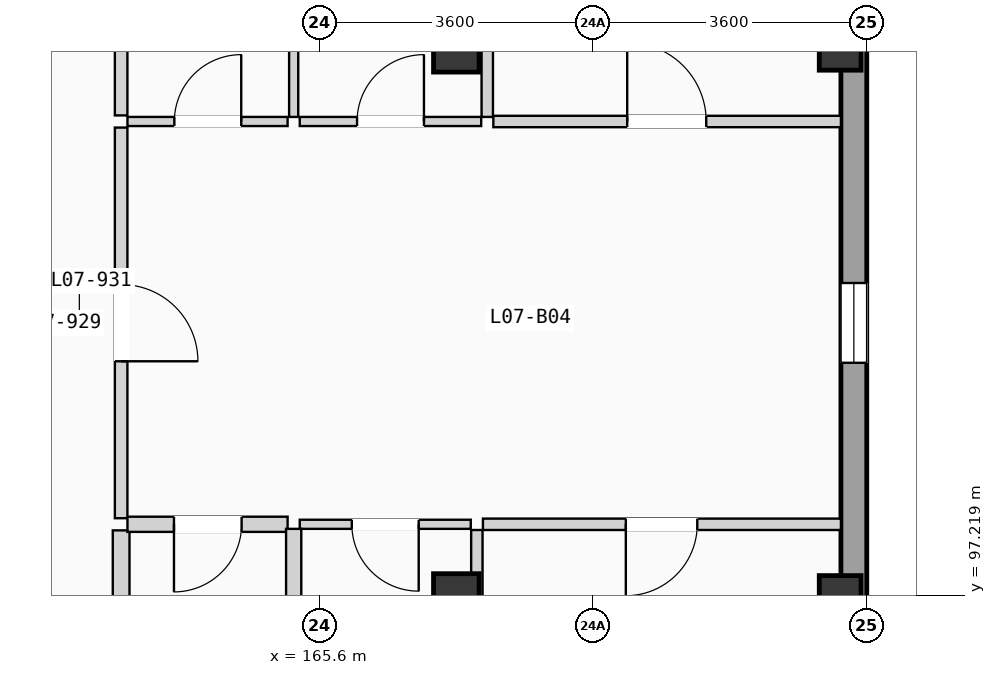
"""IFC4 building model, lengths in metres.
Left out: names, types, materials, properties, quantities, classifications, styles, units other than length and angle.
Written with IfcOpenShell. Run it as: python <this file> out.ifc"""

import sys

from ifc_helpers import new_model, si_unit, direction, frame, frame_2d, origin, origin_2d, place, context, subcontext, project, spatial, rectangle, extrude, element, fill, save


model = new_model("IFC4")
c1 = context("Model", 3, precision=1e-05, world=origin(), true_north=direction((0.0, 1.0)))
c2 = subcontext(c1, "Body", "Model", "MODEL_VIEW")
j1 = project(units=[si_unit("LENGTHUNIT", "METRE"), si_unit("PLANEANGLEUNIT", "RADIAN")], contexts=[c1])
p1 = place(None, origin())
s1 = spatial("IfcSite", under=j1, at=p1, CompositionType="ELEMENT")
p2 = place(p1, origin())
s2 = spatial("IfcBuilding", under=s1, at=p2, CompositionType="ELEMENT")
p3 = place(p2, frame((0.0, 0.0, 24.675)))
s3 = spatial("IfcBuildingStorey", under=s2, at=p3, CompositionType="ELEMENT", Elevation=24.675)
for number, where, z_axis, x_axis in (
    (1, (167.4, 97.2, 0.0), (0.0, 0.0, 1.0), (1.0, 0.0, 0.0)),
    (2, (167.4, 104.4, 0.0), (0.0, 0.0, 1.0), (1.0, 0.0, 0.0)),
):
    element("IfcColumn", number, at=place(p3, frame(where, z_axis=z_axis, x_axis=x_axis)), inside=s3, PredefinedType="COLUMN", context=c2, shape_type="SweptSolid", body=[
        extrude(rectangle(XDim=0.6, YDim=0.6, at=origin_2d()), origin(), (0.0, 0.0, 1.0), 3.15),
    ])
for number, where, z_axis, x_axis in (
    (3, (172.45, 97.2, 0.0), (0.0, 0.0, 1.0), (1.0, 0.0, 0.0)),
    (4, (172.45, 104.4, 0.0), (0.0, 0.0, 1.0), (1.0, 0.0, 0.0)),
):
    element("IfcColumn", number, at=place(p3, frame(where, z_axis=z_axis, x_axis=x_axis)), inside=s3, PredefinedType="COLUMN", context=c2, shape_type="SweptSolid", body=[
        extrude(rectangle(XDim=0.55, YDim=0.55, at=origin_2d()), origin(), (0.0, 0.0, 1.0), 3.15),
    ])
p4 = place(p3, frame((172.63, 68.74, 0.0), z_axis=(0.0, 0.0, 1.0), x_axis=(0.0, 1.0, 0.0)))
e5 = element("IfcWall", 5, at=p4, inside=s3, PredefinedType="SOLIDWALL", context=c2, shape_type="SweptSolid", body=[
    extrude(rectangle(XDim=49.72, YDim=0.34, at=frame_2d((24.86, 0.0))), origin(), (0.0, 0.0, 1.0), 2.9),
])
p5 = place(p4, frame((15.299, 0.0, 0.9)))
e6 = element("IfcOpeningElement", 6, at=p5, cuts=e5, PredefinedType="OPENING", context=c2, shape_type="SweptSolid", body=[
    extrude(rectangle(XDim=1.05, YDim=1.2, at=frame_2d((0.525, 0.6))), frame((0.0, 0.18, 0.0), z_axis=(0.0, -1.0, 0.0), x_axis=(1.0, 0.0, 0.0)), (0.0, 0.0, 1.0), 0.36),
])
p6 = place(p4, frame((8.972, 0.0, 0.865)))
e7 = element("IfcOpeningElement", 7, at=p6, cuts=e5, PredefinedType="OPENING", context=c2, shape_type="SweptSolid", body=[
    extrude(rectangle(XDim=1.05, YDim=1.35, at=frame_2d((0.525, 0.675))), frame((0.0, 0.18, 0.0), z_axis=(0.0, -1.0, 0.0), x_axis=(1.0, 0.0, 0.0)), (0.0, 0.0, 1.0), 0.36),
])
p7 = place(p4, frame((18.71, 0.0, 0.715)))
e8 = element("IfcOpeningElement", 8, at=p7, cuts=e5, PredefinedType="OPENING", context=c2, shape_type="SweptSolid", body=[
    extrude(rectangle(XDim=1.05, YDim=1.5, at=frame_2d((0.525, 0.75))), frame((0.0, 0.18, 0.0), z_axis=(0.0, -1.0, 0.0), x_axis=(1.0, 0.0, 0.0)), (0.0, 0.0, 1.0), 0.36),
])
p8 = place(p4, frame((31.535, 0.0, 0.565)))
e9 = element("IfcOpeningElement", 9, at=p8, cuts=e5, PredefinedType="OPENING", context=c2, shape_type="SweptSolid", body=[
    extrude(rectangle(XDim=1.05, YDim=1.65, at=frame_2d((0.525, 0.825))), frame((0.0, 0.18, 0.0), z_axis=(0.0, -1.0, 0.0), x_axis=(1.0, 0.0, 0.0)), (0.0, 0.0, 1.0), 0.36),
])
p9 = place(p4, frame((24.687, 0.0, 0.85)))
e10 = element("IfcOpeningElement", 10, at=p9, cuts=e5, PredefinedType="OPENING", context=c2, shape_type="SweptSolid", body=[
    extrude(rectangle(XDim=0.95, YDim=1.2, at=frame_2d((0.475, 0.6))), frame((0.0, 0.18, 0.0), z_axis=(0.0, -1.0, 0.0), x_axis=(1.0, 0.0, 0.0)), (0.0, 0.0, 1.0), 0.36),
])
p10 = place(p4, frame((38.62, 0.0, 0.9)))
e11 = element("IfcOpeningElement", 11, at=p10, cuts=e5, PredefinedType="OPENING", context=c2, shape_type="SweptSolid", body=[
    extrude(rectangle(XDim=1.15, YDim=1.2, at=frame_2d((0.575, 0.6))), frame((0.0, 0.18, 0.0), z_axis=(0.0, -1.0, 0.0), x_axis=(1.0, 0.0, 0.0)), (0.0, 0.0, 1.0), 0.36),
])
p11 = place(p3, frame((162.99, 98.23, 0.0), z_axis=(0.0, 0.0, 1.0), x_axis=(0.0, 1.0, 0.0)))
e12 = element("IfcWall", 12, at=p11, inside=s3, PredefinedType="PARTITIONING", context=c2, shape_type="SweptSolid", body=[
    extrude(rectangle(XDim=5.14, YDim=0.165, at=frame_2d((2.57, 0.0))), origin(), (0.0, 0.0, 1.0), 2.87),
])
p12 = place(p11, frame((2.065, 0.0, 0.0)))
e13 = element("IfcOpeningElement", 13, at=p12, cuts=e12, PredefinedType="OPENING", context=c2, shape_type="SweptSolid", body=[
    extrude(rectangle(XDim=1.01, YDim=2.11, at=frame_2d((0.505, 1.055))), frame((0.0, 0.093, 0.0), z_axis=(0.0, -1.0, 0.0), x_axis=(1.0, 0.0, 0.0)), (0.0, 0.0, 1.0), 0.185),
])
p13 = place(p3, frame((162.99, 90.874, 0.0), z_axis=(0.0, 0.0, 1.0), x_axis=(0.0, 1.0, 0.0)))
e14 = element("IfcWall", 14, at=p13, inside=s3, PredefinedType="PLUMBINGWALL", context=c2, shape_type="SweptSolid", body=[
    extrude(rectangle(XDim=7.196, YDim=0.22, at=frame_2d((3.598, 0.0))), origin(), (0.0, 0.0, 1.0), 2.87),
])
p14 = place(p3, frame((162.99, 103.53, 0.0), z_axis=(0.0, 0.0, 1.0), x_axis=(0.0, 1.0, 0.0)))
e15 = element("IfcWall", 15, at=p14, inside=s3, PredefinedType="PARTITIONING", context=c2, shape_type="SweptSolid", body=[
    extrude(rectangle(XDim=7.67, YDim=0.165, at=frame_2d((3.835, 0.0))), origin(), (0.0, 0.0, 1.0), 2.87),
])
p15 = place(p3, frame((163.073, 98.15, 0.0), z_axis=(0.0, 0.0, 1.0), x_axis=(1.0, 0.0, 0.0)))
e16 = element("IfcWall", 16, at=p15, inside=s3, PredefinedType="PLUMBINGWALL", context=c2, shape_type="SweptSolid", body=[
    extrude(rectangle(XDim=2.107, YDim=0.2, at=frame_2d((1.053, 0.0))), origin(), (0.0, 0.0, 1.0), 2.87),
])
p16 = place(p15, frame((0.612, 0.0, 0.0)))
e17 = element("IfcOpeningElement", 17, at=p16, cuts=e16, PredefinedType="OPENING", context=c2, shape_type="SweptSolid", body=[
    extrude(rectangle(XDim=0.89, YDim=2.03, at=frame_2d((0.445, 1.015))), frame((0.0, 0.11, 0.0), z_axis=(0.0, -1.0, 0.0), x_axis=(1.0, 0.0, 0.0)), (0.0, 0.0, 1.0), 0.22),
])
p17 = place(p3, frame((163.073, 103.45, 0.0), z_axis=(0.0, 0.0, 1.0), x_axis=(1.0, 0.0, 0.0)))
e18 = element("IfcWall", 18, at=p17, inside=s3, PredefinedType="PARTITIONING", context=c2, shape_type="SweptSolid", body=[
    extrude(rectangle(XDim=2.107, YDim=0.12, at=frame_2d((1.053, 0.0))), origin(), (0.0, 0.0, 1.0), 2.87),
])
p18 = place(p17, frame((0.617, 0.0, 0.0)))
e19 = element("IfcOpeningElement", 19, at=p18, cuts=e18, PredefinedType="OPENING", context=c2, shape_type="SweptSolid", body=[
    extrude(rectangle(XDim=0.88, YDim=2.02, at=frame_2d((0.44, 1.01))), frame((0.0, 0.07, 0.0), z_axis=(0.0, -1.0, 0.0), x_axis=(1.0, 0.0, 0.0)), (0.0, 0.0, 1.0), 0.14),
])
p19 = place(p3, frame((167.75, 98.15, 0.0), z_axis=(0.0, 0.0, 1.0), x_axis=(1.0, 0.0, 0.0)))
e20 = element("IfcWall", 20, at=p19, inside=s3, PredefinedType="PARTITIONING", context=c2, shape_type="SweptSolid", body=[
    extrude(rectangle(XDim=4.71, YDim=0.15, at=frame_2d((2.355, 0.0))), origin(), (0.0, 0.0, 1.0), 2.87),
])
p20 = place(p19, frame((1.88, 0.0, 0.0)))
e21 = element("IfcOpeningElement", 21, at=p20, cuts=e20, PredefinedType="OPENING", context=c2, shape_type="SweptSolid", body=[
    extrude(rectangle(XDim=0.94, YDim=2.06, at=frame_2d((0.47, 1.03))), frame((0.0, 0.085, 0.0), z_axis=(0.0, -1.0, 0.0), x_axis=(1.0, 0.0, 0.0)), (0.0, 0.0, 1.0), 0.17),
])
p21 = place(p3, frame((165.34, 98.15, 0.0), z_axis=(0.0, 0.0, 1.0), x_axis=(1.0, 0.0, 0.0)))
e22 = element("IfcWall", 22, at=p21, inside=s3, PredefinedType="PARTITIONING", context=c2, shape_type="SweptSolid", body=[
    extrude(rectangle(XDim=2.25, YDim=0.12, at=frame_2d((1.125, 0.0))), origin(), (0.0, 0.0, 1.0), 2.87),
])
p22 = place(p21, frame((0.685, 0.0, 0.0)))
e23 = element("IfcOpeningElement", 23, at=p22, cuts=e22, PredefinedType="OPENING", context=c2, shape_type="SweptSolid", body=[
    extrude(rectangle(XDim=0.88, YDim=2.02, at=frame_2d((0.44, 1.01))), frame((0.0, 0.07, 0.0), z_axis=(0.0, -1.0, 0.0), x_axis=(1.0, 0.0, 0.0)), (0.0, 0.0, 1.0), 0.14),
])
p23 = place(p3, frame((167.887, 103.45, 0.0), z_axis=(0.0, 0.0, 1.0), x_axis=(1.0, 0.0, 0.0)))
e24 = element("IfcWall", 24, at=p23, inside=s3, PredefinedType="PARTITIONING", context=c2, shape_type="SweptSolid", body=[
    extrude(rectangle(XDim=4.573, YDim=0.15, at=frame_2d((2.287, 0.0))), origin(), (0.0, 0.0, 1.0), 2.87),
])
p24 = place(p23, frame((1.761, 0.0, 0.0)))
e25 = element("IfcOpeningElement", 25, at=p24, cuts=e24, PredefinedType="OPENING", context=c2, shape_type="SweptSolid", body=[
    extrude(rectangle(XDim=1.04, YDim=2.08, at=frame_2d((0.52, 1.04))), frame((0.0, 0.085, 0.0), z_axis=(0.0, -1.0, 0.0), x_axis=(1.0, 0.0, 0.0)), (0.0, 0.0, 1.0), 0.17),
])
p25 = place(p3, frame((165.34, 103.45, 0.0), z_axis=(0.0, 0.0, 1.0), x_axis=(1.0, 0.0, 0.0)))
e26 = element("IfcWall", 26, at=p25, inside=s3, PredefinedType="PARTITIONING", context=c2, shape_type="SweptSolid", body=[
    extrude(rectangle(XDim=2.387, YDim=0.12, at=frame_2d((1.193, 0.0))), origin(), (0.0, 0.0, 1.0), 2.87),
])
p26 = place(p25, frame((0.754, 0.0, 0.0)))
e27 = element("IfcOpeningElement", 27, at=p26, cuts=e26, PredefinedType="OPENING", context=c2, shape_type="SweptSolid", body=[
    extrude(rectangle(XDim=0.88, YDim=2.02, at=frame_2d((0.44, 1.01))), frame((0.0, 0.07, 0.0), z_axis=(0.0, -1.0, 0.0), x_axis=(1.0, 0.0, 0.0)), (0.0, 0.0, 1.0), 0.14),
])
p27 = place(p3, frame((165.26, 90.874, 0.0), z_axis=(0.0, 0.0, 1.0), x_axis=(0.0, 1.0, 0.0)))
e28 = element("IfcWall", 28, at=p27, inside=s3, PredefinedType="PLUMBINGWALL", context=c2, shape_type="SweptSolid", body=[
    extrude(rectangle(XDim=7.216, YDim=0.2, at=frame_2d((3.608, 0.0))), origin(), (0.0, 0.0, 1.0), 2.87),
])
p28 = place(p27, frame((3.173, 0.0, 0.0)))
e29 = element("IfcOpeningElement", 29, at=p28, cuts=e28, PredefinedType="OPENING", context=c2, shape_type="SweptSolid", body=[
    extrude(rectangle(XDim=0.85, YDim=2.01, at=frame_2d((0.425, 1.005))), frame((0.0, 0.11, 0.0), z_axis=(0.0, -1.0, 0.0), x_axis=(1.0, 0.0, 0.0)), (0.0, 0.0, 1.0), 0.22),
])
p29 = place(p3, frame((165.26, 103.51, 0.0), z_axis=(0.0, 0.0, 1.0), x_axis=(0.0, 1.0, 0.0)))
e30 = element("IfcWall", 30, at=p29, inside=s3, PredefinedType="PARTITIONING", context=c2, shape_type="SweptSolid", body=[
    extrude(rectangle(XDim=7.69, YDim=0.12, at=frame_2d((3.845, 0.0))), origin(), (0.0, 0.0, 1.0), 2.87),
])
p30 = place(p3, frame((167.67, 90.874, 0.0), z_axis=(0.0, 0.0, 1.0), x_axis=(0.0, 1.0, 0.0)))
e31 = element("IfcWall", 31, at=p30, inside=s3, PredefinedType="PARTITIONING", context=c2, shape_type="SweptSolid", body=[
    extrude(rectangle(XDim=7.201, YDim=0.15, at=frame_2d((3.601, 0.0))), origin(), (0.0, 0.0, 1.0), 2.87),
])
p31 = place(p3, frame((167.807, 103.51, 0.0), z_axis=(0.0, 0.0, 1.0), x_axis=(0.0, 1.0, 0.0)))
e32 = element("IfcWall", 32, at=p31, inside=s3, PredefinedType="PARTITIONING", context=c2, shape_type="SweptSolid", body=[
    extrude(rectangle(XDim=7.69, YDim=0.15, at=frame_2d((3.845, 0.0))), origin(), (0.0, 0.0, 1.0), 2.87),
])
p32 = place(p8, origin())
e33 = element("IfcWindow", 33, at=p32, inside=s3, PartitioningType="SINGLE_PANEL", PredefinedType="WINDOW", context=c2, shape_type="SweptSolid", body=[
    extrude(rectangle(XDim=1.05, YDim=1.65, at=frame_2d((0.525, 0.825))), frame((0.0, 0.03, 0.0), z_axis=(0.0, -1.0, 0.0), x_axis=(1.0, 0.0, 0.0)), (0.0, 0.0, 1.0), 0.06),
])
fill(e9, e33)
p33 = place(p12, frame((1.01, 0.0, 0.0), z_axis=(0.0, 0.0, 1.0), x_axis=(-1.0, 0.0, 0.0)))
e34 = element("IfcDoor", 34, at=p33, inside=s3, OperationType="SINGLE_SWING_LEFT", PredefinedType="DOOR", context=c2, shape_type="SweptSolid", body=[
    extrude(rectangle(XDim=1.01, YDim=2.11, at=frame_2d((0.505, 1.055))), frame((0.0, 0.025, 0.0), z_axis=(0.0, -1.0, 0.0), x_axis=(1.0, 0.0, 0.0)), (0.0, 0.0, 1.0), 0.05),
])
fill(e13, e34)
p34 = place(p16, frame((0.89, 0.0, 0.0), z_axis=(0.0, 0.0, 1.0), x_axis=(-1.0, 0.0, 0.0)))
e35 = element("IfcDoor", 35, at=p34, inside=s3, OperationType="SINGLE_SWING_LEFT", PredefinedType="DOOR", context=c2, shape_type="SweptSolid", body=[
    extrude(rectangle(XDim=0.89, YDim=2.03, at=frame_2d((0.445, 1.015))), frame((0.0, 0.025, 0.0), z_axis=(0.0, -1.0, 0.0), x_axis=(1.0, 0.0, 0.0)), (0.0, 0.0, 1.0), 0.05),
])
fill(e17, e35)
p35 = place(p18, origin())
e36 = element("IfcDoor", 36, at=p35, inside=s3, OperationType="SINGLE_SWING_RIGHT", PredefinedType="DOOR", context=c2, shape_type="SweptSolid", body=[
    extrude(rectangle(XDim=0.88, YDim=2.02, at=frame_2d((0.44, 1.01))), frame((0.0, 0.025, 0.0), z_axis=(0.0, -1.0, 0.0), x_axis=(1.0, 0.0, 0.0)), (0.0, 0.0, 1.0), 0.05),
])
fill(e19, e36)
p36 = place(p20, frame((0.94, 0.0, 0.0), z_axis=(0.0, 0.0, 1.0), x_axis=(-1.0, 0.0, 0.0)))
e37 = element("IfcDoor", 37, at=p36, inside=s3, OperationType="SINGLE_SWING_LEFT", PredefinedType="DOOR", context=c2, shape_type="SweptSolid", body=[
    extrude(rectangle(XDim=0.94, YDim=2.06, at=frame_2d((0.47, 1.03))), frame((0.0, 0.025, 0.0), z_axis=(0.0, -1.0, 0.0), x_axis=(1.0, 0.0, 0.0)), (0.0, 0.0, 1.0), 0.05),
])
fill(e21, e37)
p37 = place(p22, frame((0.88, 0.0, 0.0), z_axis=(0.0, 0.0, 1.0), x_axis=(-1.0, 0.0, 0.0)))
e38 = element("IfcDoor", 38, at=p37, inside=s3, OperationType="SINGLE_SWING_RIGHT", PredefinedType="DOOR", context=c2, shape_type="SweptSolid", body=[
    extrude(rectangle(XDim=0.88, YDim=2.02, at=frame_2d((0.44, 1.01))), frame((0.0, 0.025, 0.0), z_axis=(0.0, -1.0, 0.0), x_axis=(1.0, 0.0, 0.0)), (0.0, 0.0, 1.0), 0.05),
])
fill(e23, e38)
p38 = place(p24, origin())
e39 = element("IfcDoor", 39, at=p38, inside=s3, OperationType="SINGLE_SWING_LEFT", PredefinedType="DOOR", context=c2, shape_type="SweptSolid", body=[
    extrude(rectangle(XDim=1.04, YDim=2.08, at=frame_2d((0.52, 1.04))), frame((0.0, 0.025, 0.0), z_axis=(0.0, -1.0, 0.0), x_axis=(1.0, 0.0, 0.0)), (0.0, 0.0, 1.0), 0.05),
])
fill(e25, e39)
p39 = place(p26, origin())
e40 = element("IfcDoor", 40, at=p39, inside=s3, OperationType="SINGLE_SWING_RIGHT", PredefinedType="DOOR", context=c2, shape_type="SweptSolid", body=[
    extrude(rectangle(XDim=0.88, YDim=2.02, at=frame_2d((0.44, 1.01))), frame((0.0, 0.025, 0.0), z_axis=(0.0, -1.0, 0.0), x_axis=(1.0, 0.0, 0.0)), (0.0, 0.0, 1.0), 0.05),
])
fill(e27, e40)
save(model, sys.argv[1])
